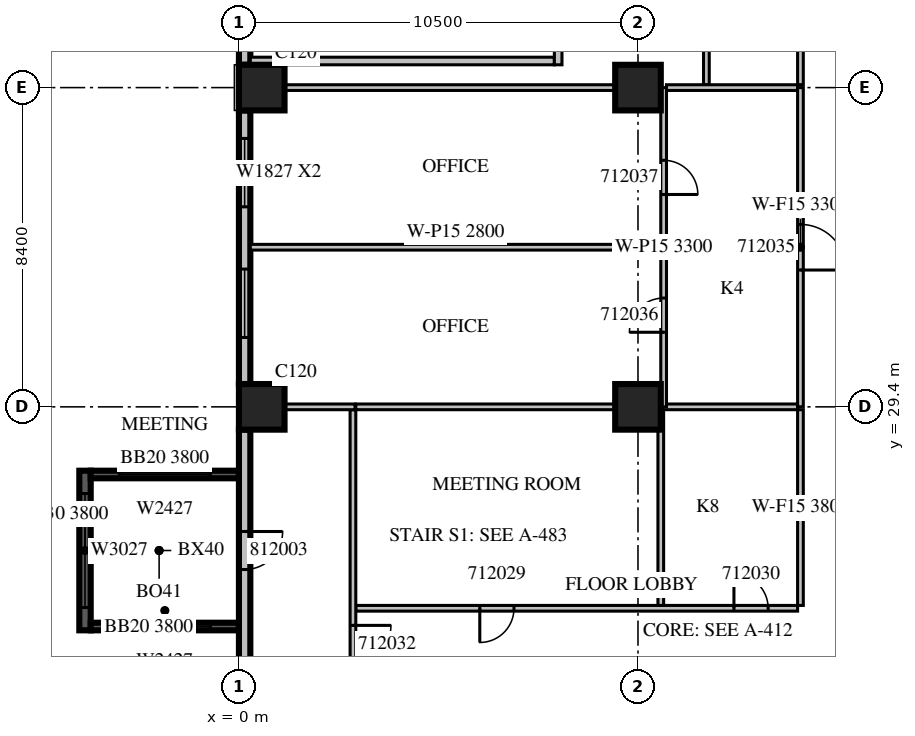
"""IFC4 building model, lengths in metres.
Left out: names, types, materials, properties, quantities, classifications, styles, units other than length and angle.
Written with IfcOpenShell. Run it as: python <this file> out.ifc"""

import sys

from ifc_helpers import new_model, si_unit, direction, frame, frame_2d, origin, origin_2d, place, context, subcontext, project, spatial, rectangle, extrude, source, transform, mapped, element, fill, save


model = new_model("IFC4")
c1 = context("Model", 3, precision=1e-05, world=origin(), true_north=direction((0.0, 1.0)))
c2 = subcontext(c1, "Body", "Model", "MODEL_VIEW")
j1 = project(units=[si_unit("LENGTHUNIT", "METRE"), si_unit("PLANEANGLEUNIT", "RADIAN")], contexts=[c1])
p1 = place(None, origin())
s1 = spatial("IfcSite", under=j1, at=p1, CompositionType="ELEMENT")
p2 = place(p1, origin())
s2 = spatial("IfcBuilding", under=s1, at=p2, CompositionType="ELEMENT")
p3 = place(p2, frame((0.0, 0.0, 61.5)))
s3 = spatial("IfcBuildingStorey", under=s2, at=p3, CompositionType="ELEMENT", Elevation=61.5)
m1 = source(origin(), c2, "Body", "SweptSolid", [
    extrude(rectangle(XDim=1.2, YDim=1.2, at=origin_2d()), origin(), (0.0, 0.0, 1.0), 4.2),
])
for number, where, z_axis, x_axis in (
    (1, (0.6, 29.4, 0.0), (0.0, 0.0, 1.0), (1.0, 0.0, 0.0)),
    (2, (10.5, 29.4, 0.0), (0.0, 0.0, 1.0), (1.0, 0.0, 0.0)),
    (3, (0.6, 37.8, 0.0), (0.0, 0.0, 1.0), (1.0, 0.0, 0.0)),
    (4, (10.5, 37.8, 0.0), (0.0, 0.0, 1.0), (1.0, 0.0, 0.0)),
):
    element("IfcColumn", number, at=place(p3, frame(where, z_axis=z_axis, x_axis=x_axis)), inside=s3, PredefinedType="COLUMN", context=c2, shape_type="MappedRepresentation", body=[
        mapped(m1, transform((0.0, 0.0, 0.0), scale=1.0)),
    ])
m2 = source(origin(), c2, "Body", "SweptSolid", [
    extrude(rectangle(XDim=4.2, YDim=0.3, at=frame_2d((2.1, 0.0))), origin(), (0.0, 0.0, 1.0), 3.8),
])
p4 = place(p3, frame((-4.05, 27.72, 0.0), z_axis=(0.0, 0.0, 1.0), x_axis=(0.0, -1.0, 0.0)))
e5 = element("IfcWall", 5, at=p4, inside=s3, PredefinedType="SOLIDWALL", context=c2, shape_type="MappedRepresentation", body=[
    mapped(m2, transform((0.0, 0.0, 0.0), scale=1.0)),
])
m3 = source(origin(), c2, "Body", "SweptSolid", [
    extrude(rectangle(XDim=3.0, YDim=2.7, at=frame_2d((1.5, 1.35))), frame((0.0, 0.16, 0.0), z_axis=(0.0, -1.0, 0.0), x_axis=(1.0, 0.0, 0.0)), (0.0, 0.0, 1.0), 0.32),
])
p5 = place(p4, frame((0.6, 0.0, 0.6)))
e6 = element("IfcOpeningElement", 6, at=p5, cuts=e5, PredefinedType="OPENING", context=c2, shape_type="MappedRepresentation", body=[
    mapped(m3, transform((0.0, 0.0, 0.0), scale=1.0)),
])
m4 = source(origin(), c2, "Body", "SweptSolid", [
    extrude(rectangle(XDim=3.9, YDim=0.2, at=frame_2d((1.95, 0.0))), origin(), (0.0, 0.0, 1.0), 3.8),
])
p6 = place(p3, frame((0.0, 27.62, 0.0), z_axis=(0.0, 0.0, 1.0), x_axis=(-1.0, 0.0, 0.0)))
e7 = element("IfcWall", 7, at=p6, inside=s3, PredefinedType="SOLIDWALL", context=c2, shape_type="MappedRepresentation", body=[
    mapped(m4, transform((0.0, 0.0, 0.0), scale=1.0)),
])
m5 = source(origin(), c2, "Body", "SweptSolid", [
    extrude(rectangle(XDim=2.4, YDim=2.7, at=frame_2d((1.2, 1.35))), frame((0.0, 0.11, 0.0), z_axis=(0.0, -1.0, 0.0), x_axis=(1.0, 0.0, 0.0)), (0.0, 0.0, 1.0), 0.22),
])
p7 = place(p6, frame((0.75, 0.0, 0.6)))
e8 = element("IfcOpeningElement", 8, at=p7, cuts=e7, PredefinedType="OPENING", context=c2, shape_type="MappedRepresentation", body=[
    mapped(m5, transform((0.0, 0.0, 0.0), scale=1.0)),
])
p8 = place(p3, frame((0.0, 23.62, 0.0), z_axis=(0.0, 0.0, 1.0), x_axis=(-1.0, 0.0, 0.0)))
e9 = element("IfcWall", 9, at=p8, inside=s3, PredefinedType="SOLIDWALL", context=c2, shape_type="MappedRepresentation", body=[
    mapped(m4, transform((0.0, 0.0, 0.0), scale=1.0)),
])
p9 = place(p8, frame((0.75, 0.0, 0.6)))
e10 = element("IfcOpeningElement", 10, at=p9, cuts=e9, PredefinedType="OPENING", context=c2, shape_type="MappedRepresentation", body=[
    mapped(m5, transform((0.0, 0.0, 0.0), scale=1.0)),
])
m6 = source(origin(), c2, "Body", "SweptSolid", [
    extrude(rectangle(XDim=1.8, YDim=0.3, at=frame_2d((0.9, 0.0))), origin(), (0.0, 0.0, 1.0), 3.8),
])
p10 = place(p3, frame((0.15, 40.2, 0.0), z_axis=(0.0, 0.0, 1.0), x_axis=(0.0, -1.0, 0.0)))
e11 = element("IfcWall", 11, at=p10, inside=s3, PredefinedType="STANDARD", context=c2, shape_type="MappedRepresentation", body=[
    mapped(m6, transform((0.0, 0.0, 0.0), scale=1.0)),
])
m7 = source(origin(), c2, "Body", "SweptSolid", [
    extrude(rectangle(XDim=7.2, YDim=0.3, at=frame_2d((3.6, 0.0))), origin(), (0.0, 0.0, 1.0), 3.8),
])
p11 = place(p3, frame((0.15, 37.2, 0.0), z_axis=(0.0, 0.0, 1.0), x_axis=(0.0, -1.0, 0.0)))
e12 = element("IfcWall", 12, at=p11, inside=s3, PredefinedType="STANDARD", context=c2, shape_type="MappedRepresentation", body=[
    mapped(m7, transform((0.0, 0.0, 0.0), scale=1.0)),
])
m8 = source(origin(), c2, "Body", "SweptSolid", [
    extrude(rectangle(XDim=1.8, YDim=2.7, at=frame_2d((0.9, 1.35))), frame((0.0, 0.16, 0.0), z_axis=(0.0, -1.0, 0.0), x_axis=(1.0, 0.0, 0.0)), (0.0, 0.0, 1.0), 0.32),
])
p12 = place(p11, frame((0.738, 0.0, 0.6)))
e13 = element("IfcOpeningElement", 13, at=p12, cuts=e12, PredefinedType="OPENING", context=c2, shape_type="MappedRepresentation", body=[
    mapped(m8, transform((0.0, 0.0, 0.0), scale=1.0)),
])
p13 = place(p11, frame((4.175, 0.0, 0.6)))
e14 = element("IfcOpeningElement", 14, at=p13, cuts=e12, PredefinedType="OPENING", context=c2, shape_type="MappedRepresentation", body=[
    mapped(m8, transform((0.0, 0.0, 0.0), scale=1.0)),
])
p14 = place(p3, frame((0.15, 28.8, 0.0), z_axis=(0.0, 0.0, 1.0), x_axis=(0.0, -1.0, 0.0)))
e15 = element("IfcWall", 15, at=p14, inside=s3, PredefinedType="STANDARD", context=c2, shape_type="MappedRepresentation", body=[
    mapped(m7, transform((0.0, 0.0, 0.0), scale=1.0)),
])
m9 = source(origin(), c2, "Body", "SweptSolid", [
    extrude(rectangle(XDim=1.0, YDim=2.1, at=frame_2d((0.5, 1.05))), frame((0.0, 0.16, 0.0), z_axis=(0.0, -1.0, 0.0), x_axis=(1.0, 0.0, 0.0)), (0.0, 0.0, 1.0), 0.32),
])
p15 = place(p14, frame((2.68, 0.0, 0.0)))
e16 = element("IfcOpeningElement", 16, at=p15, cuts=e15, PredefinedType="OPENING", context=c2, shape_type="MappedRepresentation", body=[
    mapped(m9, transform((0.0, 0.0, 0.0), scale=1.0)),
])
m10 = source(origin(), c2, "Body", "SweptSolid", [
    extrude(rectangle(XDim=8.0, YDim=0.2, at=frame_2d((4.0, 0.0))), origin(), (0.0, 0.0, 1.0), 3.8),
])
p16 = place(p3, frame((0.3, 38.5, 0.0), z_axis=(0.0, 0.0, 1.0), x_axis=(1.0, 0.0, 0.0)))
e17 = element("IfcWall", 17, at=p16, inside=s3, PredefinedType="PARTITIONING", context=c2, shape_type="MappedRepresentation", body=[
    mapped(m10, transform((0.0, 0.0, 0.0), scale=1.0)),
])
m11 = source(origin(), c2, "Body", "SweptSolid", [
    extrude(rectangle(XDim=5.45, YDim=0.2, at=frame_2d((2.725, 0.0))), origin(), (0.0, 0.0, 1.0), 3.8),
])
p17 = place(p3, frame((8.4, 38.4, 0.0), z_axis=(0.0, 0.0, 1.0), x_axis=(0.0, 1.0, 0.0)))
e18 = element("IfcWall", 18, at=p17, inside=s3, PredefinedType="PARTITIONING", context=c2, shape_type="MappedRepresentation", body=[
    mapped(m11, transform((0.0, 0.0, 0.0), scale=1.0)),
])
m12 = source(origin(), c2, "Body", "SweptSolid", [
    extrude(rectangle(XDim=1.2, YDim=2.1, at=frame_2d((0.6, 1.05))), frame((0.0, 0.11, 0.0), z_axis=(0.0, -1.0, 0.0), x_axis=(1.0, 0.0, 0.0)), (0.0, 0.0, 1.0), 0.22),
])
p18 = place(p17, frame((0.4, 0.0, 0.0)))
e19 = element("IfcOpeningElement", 19, at=p18, cuts=e18, PredefinedType="OPENING", context=c2, shape_type="MappedRepresentation", body=[
    mapped(m12, transform((0.0, 0.0, 0.0), scale=1.0)),
])
m13 = source(origin(), c2, "Body", "SweptSolid", [
    extrude(rectangle(XDim=0.9, YDim=2.1, at=frame_2d((0.45, 1.05))), frame((0.0, 0.11, 0.0), z_axis=(0.0, -1.0, 0.0), x_axis=(1.0, 0.0, 0.0)), (0.0, 0.0, 1.0), 0.22),
])
p19 = place(p17, frame((3.25, 0.0, 0.0)))
e20 = element("IfcOpeningElement", 20, at=p19, cuts=e18, PredefinedType="OPENING", context=c2, shape_type="MappedRepresentation", body=[
    mapped(m13, transform((0.0, 0.0, 0.0), scale=1.0)),
])
p20 = place(p3, frame((3.075, 24.1, 0.0), z_axis=(0.0, 0.0, 1.0), x_axis=(1.0, 0.0, 0.0)))
e21 = element("IfcWall", 21, at=p20, inside=s3, PredefinedType="PARTITIONING", context=c2, shape_type="SweptSolid", body=[
    extrude(rectangle(XDim=11.625, YDim=0.15, at=frame_2d((5.812, 0.0))), origin(), (0.0, 0.0, 1.0), 3.8),
])
m14 = source(origin(), c2, "Body", "SweptSolid", [
    extrude(rectangle(XDim=0.9, YDim=2.1, at=frame_2d((0.45, 1.05))), frame((0.0, 0.085, 0.0), z_axis=(0.0, -1.0, 0.0), x_axis=(1.0, 0.0, 0.0)), (0.0, 0.0, 1.0), 0.17),
])
p21 = place(p20, frame((3.263, 0.0, 0.0)))
e22 = element("IfcOpeningElement", 22, at=p21, cuts=e21, PredefinedType="OPENING", context=c2, shape_type="MappedRepresentation", body=[
    mapped(m14, transform((0.0, 0.0, 0.0), scale=1.0)),
])
p22 = place(p20, frame((9.95, 0.0, 0.0)))
e23 = element("IfcOpeningElement", 23, at=p22, cuts=e21, PredefinedType="OPENING", context=c2, shape_type="MappedRepresentation", body=[
    mapped(m14, transform((0.0, 0.0, 0.0), scale=1.0)),
])
m15 = source(origin(), c2, "Body", "SweptSolid", [
    extrude(rectangle(XDim=5.15, YDim=0.15, at=frame_2d((2.575, 0.0))), origin(), (0.0, 0.0, 1.0), 3.8),
])
for number, where, z_axis, x_axis in (
    (24, (11.1, 24.175, 0.0), (0.0, 0.0, 1.0), (0.0, 1.0, 0.0)),
    (25, (14.775, 24.175, 0.0), (0.0, 0.0, 1.0), (0.0, 1.0, 0.0)),
):
    element("IfcWall", number, at=place(p3, frame(where, z_axis=z_axis, x_axis=x_axis)), inside=s3, PredefinedType="PARTITIONING", context=c2, shape_type="MappedRepresentation", body=[
        mapped(m15, transform((0.0, 0.0, 0.0), scale=1.0)),
    ])
m16 = source(origin(), c2, "Body", "SweptSolid", [
    extrude(rectangle(XDim=6.826, YDim=0.15, at=frame_2d((3.413, 0.0))), origin(), (0.0, 0.0, 1.0), 3.8),
])
p23 = place(p3, frame((9.901, 29.4, 0.0), z_axis=(0.0, 0.0, 1.0), x_axis=(-1.0, 0.0, 0.0)))
e26 = element("IfcWall", 26, at=p23, inside=s3, PredefinedType="PARTITIONING", context=c2, shape_type="MappedRepresentation", body=[
    mapped(m16, transform((0.0, 0.0, 0.0), scale=1.0)),
])
m17 = source(origin(), c2, "Body", "SweptSolid", [
    extrude(rectangle(XDim=3.601, YDim=0.15, at=frame_2d((1.8, 0.0))), origin(), (0.0, 0.0, 1.0), 3.8),
])
p24 = place(p3, frame((14.7, 29.4, 0.0), z_axis=(0.0, 0.0, 1.0), x_axis=(-1.0, 0.0, 0.0)))
e27 = element("IfcWall", 27, at=p24, inside=s3, PredefinedType="PARTITIONING", context=c2, shape_type="MappedRepresentation", body=[
    mapped(m17, transform((0.0, 0.0, 0.0), scale=1.0)),
])
m18 = source(origin(), c2, "Body", "SweptSolid", [
    extrude(rectangle(XDim=7.125, YDim=0.15, at=frame_2d((3.562, 0.0))), origin(), (0.0, 0.0, 1.0), 3.8),
])
p25 = place(p3, frame((3.0, 29.325, 0.0), z_axis=(0.0, 0.0, 1.0), x_axis=(0.0, -1.0, 0.0)))
e28 = element("IfcWall", 28, at=p25, inside=s3, PredefinedType="PARTITIONING", context=c2, shape_type="MappedRepresentation", body=[
    mapped(m18, transform((0.0, 0.0, 0.0), scale=1.0)),
])
m19 = source(origin(), c2, "Body", "SweptSolid", [
    extrude(rectangle(XDim=1.0, YDim=2.1, at=frame_2d((0.5, 1.05))), frame((0.0, 0.085, 0.0), z_axis=(0.0, -1.0, 0.0), x_axis=(1.0, 0.0, 0.0)), (0.0, 0.0, 1.0), 0.17),
])
p26 = place(p25, frame((5.675, 0.0, 0.0)))
e29 = element("IfcOpeningElement", 29, at=p26, cuts=e28, PredefinedType="OPENING", context=c2, shape_type="MappedRepresentation", body=[
    mapped(m19, transform((0.0, 0.0, 0.0), scale=1.0)),
])
m20 = source(origin(), c2, "Body", "SweptSolid", [
    extrude(rectangle(XDim=6.45, YDim=0.15, at=frame_2d((3.225, 0.0))), origin(), (0.0, 0.0, 1.0), 3.8),
])
p27 = place(p3, frame((12.3, 44.325, 0.0), z_axis=(0.0, 0.0, 1.0), x_axis=(0.0, -1.0, 0.0)))
e30 = element("IfcWall", 30, at=p27, inside=s3, PredefinedType="PARTITIONING", context=c2, shape_type="MappedRepresentation", body=[
    mapped(m20, transform((0.0, 0.0, 0.0), scale=1.0)),
])
p28 = place(p3, frame((14.775, 37.875, 0.0), z_axis=(0.0, 0.0, 1.0), x_axis=(0.0, 1.0, 0.0)))
e31 = element("IfcWall", 31, at=p28, inside=s3, PredefinedType="PARTITIONING", context=c2, shape_type="MappedRepresentation", body=[
    mapped(m20, transform((0.0, 0.0, 0.0), scale=1.0)),
])
p29 = place(p28, frame((2.737, 0.0, 0.0)))
e32 = element("IfcOpeningElement", 32, at=p29, cuts=e31, PredefinedType="OPENING", context=c2, shape_type="MappedRepresentation", body=[
    mapped(m14, transform((0.0, 0.0, 0.0), scale=1.0)),
])
p30 = place(p3, frame((11.1, 33.6, 0.0), z_axis=(0.0, 0.0, 1.0), x_axis=(-1.0, 0.0, 0.0)))
e33 = element("IfcWall", 33, at=p30, inside=s3, PredefinedType="PARTITIONING", context=c2, shape_type="SweptSolid", body=[
    extrude(rectangle(XDim=10.8, YDim=0.15, at=frame_2d((5.4, 0.0))), origin(), (0.0, 0.0, 1.0), 2.8),
])
m21 = source(origin(), c2, "Body", "SweptSolid", [
    extrude(rectangle(XDim=1.856, YDim=0.15, at=frame_2d((0.928, 0.0))), origin(), (0.0, 0.0, 1.0), 3.8),
])
p31 = place(p3, frame((3.055, 29.4, 0.0), z_axis=(0.0, 0.0, 1.0), x_axis=(-1.0, 0.0, 0.0)))
e34 = element("IfcWall", 34, at=p31, inside=s3, PredefinedType="PARTITIONING", context=c2, shape_type="MappedRepresentation", body=[
    mapped(m21, transform((0.0, 0.0, 0.0), scale=1.0)),
])
m22 = source(origin(), c2, "Body", "SweptSolid", [
    extrude(rectangle(XDim=8.702, YDim=0.15, at=frame_2d((4.351, 0.0))), origin(), (0.0, 0.0, 1.0), 3.8),
])
p32 = place(p3, frame((9.901, 37.8, 0.0), z_axis=(0.0, 0.0, 1.0), x_axis=(-1.0, 0.0, 0.0)))
e35 = element("IfcWall", 35, at=p32, inside=s3, PredefinedType="PARTITIONING", context=c2, shape_type="MappedRepresentation", body=[
    mapped(m22, transform((0.0, 0.0, 0.0), scale=1.0)),
])
m23 = source(origin(), c2, "Body", "SweptSolid", [
    extrude(rectangle(XDim=3.45, YDim=0.15, at=frame_2d((1.725, 0.0))), origin(), (0.0, 0.0, 1.0), 3.8),
])
p33 = place(p3, frame((14.7, 37.8, 0.0), z_axis=(0.0, 0.0, 1.0), x_axis=(-1.0, 0.0, 0.0)))
e36 = element("IfcWall", 36, at=p33, inside=s3, PredefinedType="PARTITIONING", context=c2, shape_type="MappedRepresentation", body=[
    mapped(m23, transform((0.0, 0.0, 0.0), scale=1.0)),
])
m24 = source(origin(), c2, "Body", "SweptSolid", [
    extrude(rectangle(XDim=8.4, YDim=0.15, at=frame_2d((4.2, 0.0))), origin(), (0.0, 0.0, 1.0), 3.3),
])
p34 = place(p3, frame((11.175, 29.4, 0.0), z_axis=(0.0, 0.0, 1.0), x_axis=(0.0, 1.0, 0.0)))
e37 = element("IfcWall", 37, at=p34, inside=s3, PredefinedType="PARTITIONING", context=c2, shape_type="MappedRepresentation", body=[
    mapped(m24, transform((0.0, 0.0, 0.0), scale=1.0)),
])
p35 = place(p34, frame((1.962, 0.0, 0.0)))
e38 = element("IfcOpeningElement", 38, at=p35, cuts=e37, PredefinedType="OPENING", context=c2, shape_type="MappedRepresentation", body=[
    mapped(m14, transform((0.0, 0.0, 0.0), scale=1.0)),
])
p36 = place(p34, frame((5.588, 0.0, 0.0)))
e39 = element("IfcOpeningElement", 39, at=p36, cuts=e37, PredefinedType="OPENING", context=c2, shape_type="MappedRepresentation", body=[
    mapped(m14, transform((0.0, 0.0, 0.0), scale=1.0)),
])
p37 = place(p3, frame((14.775, 29.4, 0.0), z_axis=(0.0, 0.0, 1.0), x_axis=(0.0, 1.0, 0.0)))
e40 = element("IfcWall", 40, at=p37, inside=s3, PredefinedType="PARTITIONING", context=c2, shape_type="MappedRepresentation", body=[
    mapped(m24, transform((0.0, 0.0, 0.0), scale=1.0)),
])
m25 = source(origin(), c2, "Body", "SweptSolid", [
    extrude(rectangle(XDim=1.2, YDim=2.1, at=frame_2d((0.6, 1.05))), frame((0.0, 0.085, 0.0), z_axis=(0.0, -1.0, 0.0), x_axis=(1.0, 0.0, 0.0)), (0.0, 0.0, 1.0), 0.17),
])
p38 = place(p37, frame((3.6, 0.0, 0.0)))
e41 = element("IfcOpeningElement", 41, at=p38, cuts=e40, PredefinedType="OPENING", context=c2, shape_type="MappedRepresentation", body=[
    mapped(m25, transform((0.0, 0.0, 0.0), scale=1.0)),
])
m26 = source(origin(), c2, "Body", "SweptSolid", [
    extrude(rectangle(XDim=3.0, YDim=2.7, at=frame_2d((1.5, 1.35))), frame((0.0, 0.03, 0.0), z_axis=(0.0, -1.0, 0.0), x_axis=(1.0, 0.0, 0.0)), (0.0, 0.0, 1.0), 0.06),
])
p39 = place(p5, origin())
e42 = element("IfcWindow", 42, at=p39, inside=s3, PartitioningType="SINGLE_PANEL", PredefinedType="WINDOW", context=c2, shape_type="MappedRepresentation", body=[
    mapped(m26, transform((0.0, 0.0, 0.0), scale=1.0)),
])
fill(e6, e42)
m27 = source(origin(), c2, "Body", "SweptSolid", [
    extrude(rectangle(XDim=2.4, YDim=2.7, at=frame_2d((1.2, 1.35))), frame((0.0, 0.03, 0.0), z_axis=(0.0, -1.0, 0.0), x_axis=(1.0, 0.0, 0.0)), (0.0, 0.0, 1.0), 0.06),
])
p40 = place(p7, origin())
e43 = element("IfcWindow", 43, at=p40, inside=s3, PartitioningType="SINGLE_PANEL", PredefinedType="WINDOW", context=c2, shape_type="MappedRepresentation", body=[
    mapped(m27, transform((0.0, 0.0, 0.0), scale=1.0)),
])
fill(e8, e43)
p41 = place(p9, origin())
e44 = element("IfcWindow", 44, at=p41, inside=s3, PartitioningType="SINGLE_PANEL", PredefinedType="WINDOW", context=c2, shape_type="MappedRepresentation", body=[
    mapped(m27, transform((0.0, 0.0, 0.0), scale=1.0)),
])
fill(e10, e44)
m28 = source(origin(), c2, "Body", "SweptSolid", [
    extrude(rectangle(XDim=1.8, YDim=2.7, at=frame_2d((0.9, 1.35))), frame((0.0, 0.03, 0.0), z_axis=(0.0, -1.0, 0.0), x_axis=(1.0, 0.0, 0.0)), (0.0, 0.0, 1.0), 0.06),
])
p42 = place(p12, origin())
e45 = element("IfcWindow", 45, at=p42, inside=s3, PartitioningType="SINGLE_PANEL", PredefinedType="WINDOW", context=c2, shape_type="MappedRepresentation", body=[
    mapped(m28, transform((0.0, 0.0, 0.0), scale=1.0)),
])
fill(e13, e45)
p43 = place(p13, origin())
e46 = element("IfcWindow", 46, at=p43, inside=s3, PartitioningType="SINGLE_PANEL", PredefinedType="WINDOW", context=c2, shape_type="MappedRepresentation", body=[
    mapped(m28, transform((0.0, 0.0, 0.0), scale=1.0)),
])
fill(e14, e46)
m29 = source(origin(), c2, "Body", "SweptSolid", [
    extrude(rectangle(XDim=0.9, YDim=2.1, at=frame_2d((0.45, 1.05))), frame((0.0, 0.025, 0.0), z_axis=(0.0, -1.0, 0.0), x_axis=(1.0, 0.0, 0.0)), (0.0, 0.0, 1.0), 0.05),
])
p44 = place(p21, origin())
e47 = element("IfcDoor", 47, at=p44, inside=s3, OperationType="SINGLE_SWING_RIGHT", PredefinedType="DOOR", context=c2, shape_type="MappedRepresentation", body=[
    mapped(m29, transform((0.0, 0.0, 0.0), scale=1.0)),
])
fill(e22, e47)
p45 = place(p22, origin())
e48 = element("IfcDoor", 48, at=p45, inside=s3, OperationType="SINGLE_SWING_LEFT", PredefinedType="DOOR", context=c2, shape_type="MappedRepresentation", body=[
    mapped(m29, transform((0.0, 0.0, 0.0), scale=1.0)),
])
fill(e23, e48)
m30 = source(origin(), c2, "Body", "SweptSolid", [
    extrude(rectangle(XDim=1.0, YDim=2.1, at=frame_2d((0.5, 1.05))), frame((0.0, 0.025, 0.0), z_axis=(0.0, -1.0, 0.0), x_axis=(1.0, 0.0, 0.0)), (0.0, 0.0, 1.0), 0.05),
])
p46 = place(p26, origin())
e49 = element("IfcDoor", 49, at=p46, inside=s3, OperationType="SINGLE_SWING_LEFT", PredefinedType="DOOR", context=c2, shape_type="MappedRepresentation", body=[
    mapped(m30, transform((0.0, 0.0, 0.0), scale=1.0)),
])
fill(e29, e49)
m31 = source(origin(), c2, "Body", "SweptSolid", [
    extrude(rectangle(XDim=1.2, YDim=2.1, at=frame_2d((0.6, 1.05))), frame((0.0, 0.025, 0.0), z_axis=(0.0, -1.0, 0.0), x_axis=(1.0, 0.0, 0.0)), (0.0, 0.0, 1.0), 0.05),
])
p47 = place(p38, origin())
e50 = element("IfcDoor", 50, at=p47, inside=s3, OperationType="SINGLE_SWING_RIGHT", PredefinedType="DOOR", context=c2, shape_type="MappedRepresentation", body=[
    mapped(m31, transform((0.0, 0.0, 0.0), scale=1.0)),
])
fill(e41, e50)
p48 = place(p35, origin())
e51 = element("IfcDoor", 51, at=p48, inside=s3, OperationType="SINGLE_SWING_LEFT", PredefinedType="DOOR", context=c2, shape_type="MappedRepresentation", body=[
    mapped(m29, transform((0.0, 0.0, 0.0), scale=1.0)),
])
fill(e38, e51)
p49 = place(p36, origin())
e52 = element("IfcDoor", 52, at=p49, inside=s3, OperationType="SINGLE_SWING_RIGHT", PredefinedType="DOOR", context=c2, shape_type="MappedRepresentation", body=[
    mapped(m29, transform((0.0, 0.0, 0.0), scale=1.0)),
])
fill(e39, e52)
p50 = place(p15, origin())
e53 = element("IfcDoor", 53, at=p50, inside=s3, OperationType="SINGLE_SWING_LEFT", PredefinedType="DOOR", context=c2, shape_type="MappedRepresentation", body=[
    mapped(m30, transform((0.0, 0.0, 0.0), scale=1.0)),
])
fill(e16, e53)
save(model, sys.argv[1])
